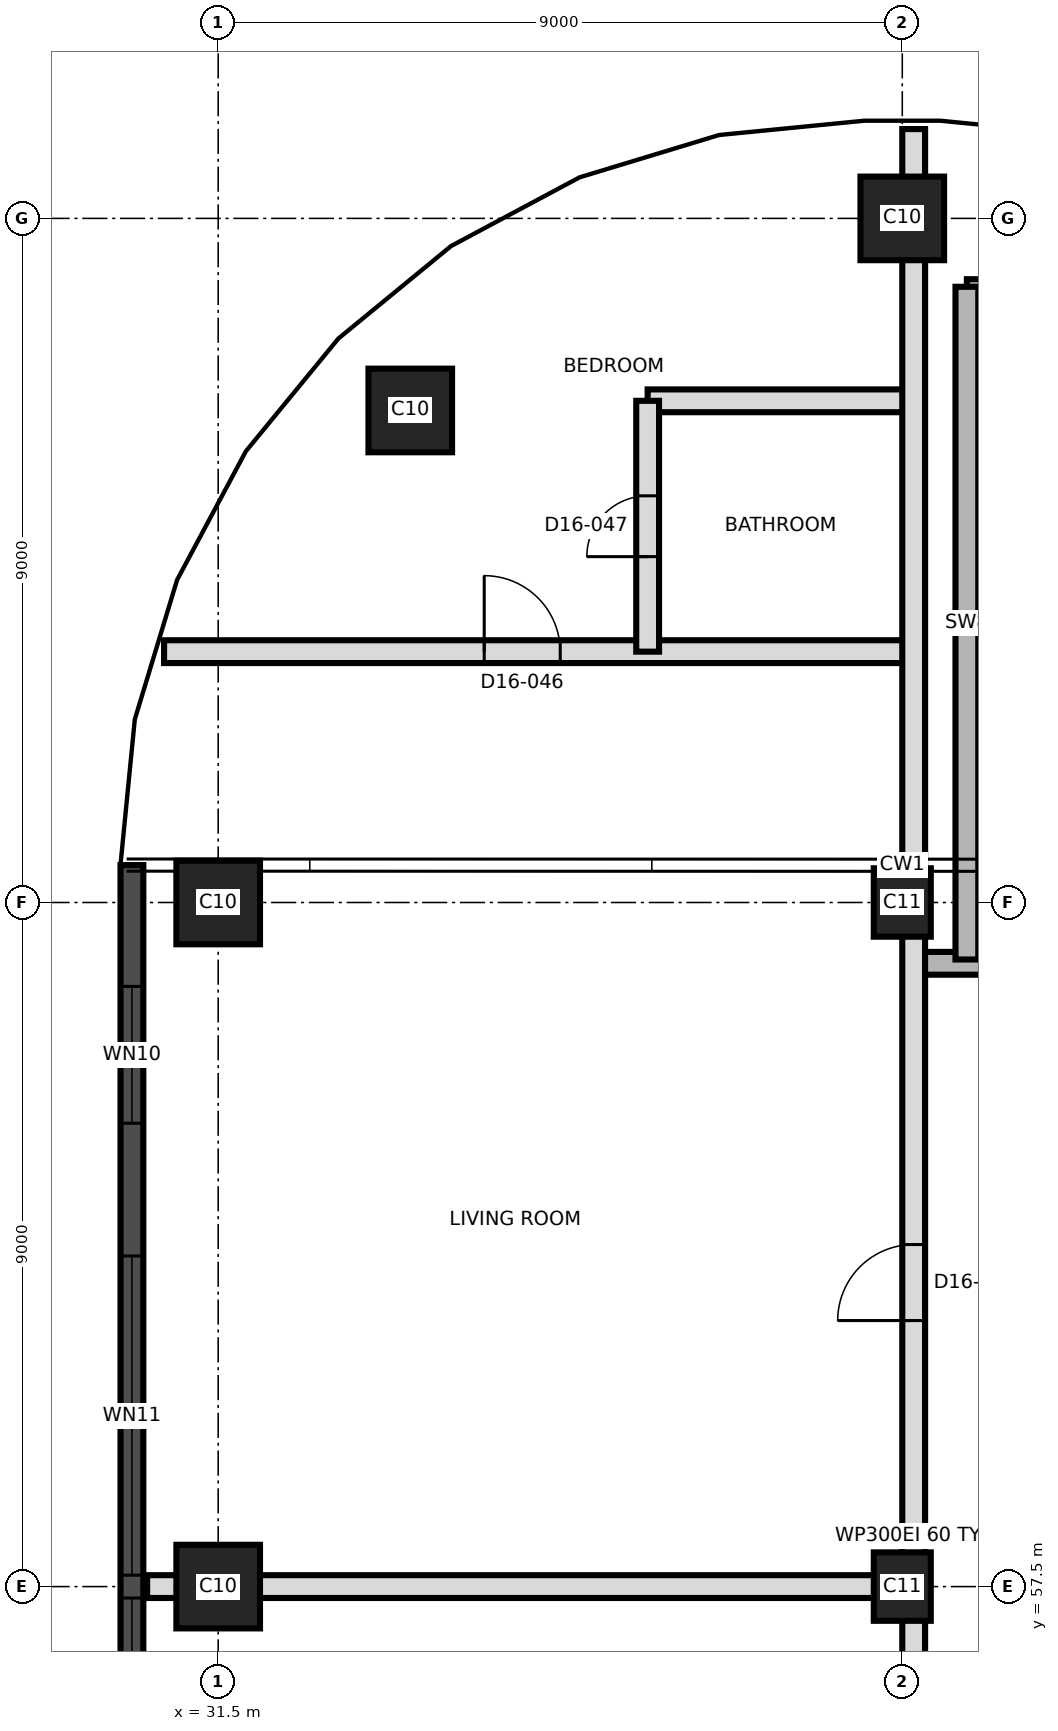
"""IFC4 building model, lengths in metres.
Left out: names, types, materials, properties, quantities, classifications, styles, units other than length and angle.
Written with IfcOpenShell. Run it as: python <this file> out.ifc"""

import sys

from ifc_helpers import new_model, si_unit, direction, frame, frame_2d, origin, origin_2d, place, context, subcontext, project, spatial, rectangle, extrude, element, fill, save


model = new_model("IFC4")
c1 = context("Model", 3, precision=1e-05, world=origin(), true_north=direction((0.0, 1.0)))
c2 = subcontext(c1, "Body", "Model", "MODEL_VIEW")
j1 = project(units=[si_unit("LENGTHUNIT", "METRE"), si_unit("PLANEANGLEUNIT", "RADIAN")], contexts=[c1])
p1 = place(None, origin())
s1 = spatial("IfcSite", under=j1, at=p1, CompositionType="ELEMENT")
p2 = place(p1, origin())
s2 = spatial("IfcBuilding", under=s1, at=p2, CompositionType="ELEMENT")
p3 = place(p2, frame((0.0, 0.0, 160.7)))
s3 = spatial("IfcBuildingStorey", under=s2, at=p3, CompositionType="ELEMENT", Elevation=160.7)
p4 = place(p3, frame((31.5, 57.5, 0.0), z_axis=(0.0, 0.0, 1.0), x_axis=(1.0, 0.0, 0.0)))
e1 = element("IfcColumn", 1, at=p4, inside=s3, PredefinedType="COLUMN", context=c2, shape_type="SweptSolid", body=[
    extrude(rectangle(XDim=1.1, YDim=1.1, at=origin_2d()), origin(), (0.0, 0.0, 1.0), 3.7),
])
p5 = place(p3, frame((40.5, 57.5, 0.0), z_axis=(0.0, 0.0, 1.0), x_axis=(0.0, 1.0, 0.0)))
e2 = element("IfcColumn", 2, at=p5, inside=s3, PredefinedType="COLUMN", context=c2, shape_type="SweptSolid", body=[
    extrude(rectangle(XDim=0.9, YDim=0.75, at=origin_2d()), origin(), (0.0, 0.0, 1.0), 3.7),
])
p6 = place(p3, frame((31.5, 66.5, 0.0), z_axis=(0.0, 0.0, 1.0), x_axis=(1.0, 0.0, 0.0)))
e3 = element("IfcColumn", 3, at=p6, inside=s3, PredefinedType="COLUMN", context=c2, shape_type="SweptSolid", body=[
    extrude(rectangle(XDim=1.1, YDim=1.1, at=origin_2d()), origin(), (0.0, 0.0, 1.0), 3.7),
])
p7 = place(p3, frame((40.5, 66.5, 0.0), z_axis=(0.0, 0.0, 1.0), x_axis=(0.0, 1.0, 0.0)))
e4 = element("IfcColumn", 4, at=p7, inside=s3, PredefinedType="COLUMN", context=c2, shape_type="SweptSolid", body=[
    extrude(rectangle(XDim=0.9, YDim=0.75, at=origin_2d()), origin(), (0.0, 0.0, 1.0), 3.7),
])
for number, where, z_axis, x_axis in (
    (5, (34.027, 72.973, 0.0), (0.0, 0.0, 1.0), (1.0, 0.0, 0.0)),
    (6, (40.5, 75.5, 0.0), (0.0, 0.0, 1.0), (1.0, 0.0, 0.0)),
):
    element("IfcColumn", number, at=place(p3, frame(where, z_axis=z_axis, x_axis=x_axis)), inside=s3, PredefinedType="COLUMN", context=c2, shape_type="SweptSolid", body=[
        extrude(rectangle(XDim=1.1, YDim=1.1, at=origin_2d()), origin(), (0.0, 0.0, 1.0), 3.7),
    ])
p8 = place(p3, frame((30.365, 66.992, 0.0), z_axis=(0.0, 0.0, 1.0), x_axis=(0.0, -1.0, 0.0)))
e7 = element("IfcWall", 7, at=p8, inside=s3, PredefinedType="SOLIDWALL", context=c2, shape_type="SweptSolid", body=[
    extrude(rectangle(XDim=32.981, YDim=0.3, at=frame_2d((16.491, 0.0))), origin(), (0.0, 0.0, 1.0), 3.4),
])
p9 = place(p8, frame((1.596, 0.0, 0.3)))
e8 = element("IfcOpeningElement", 8, at=p9, cuts=e7, PredefinedType="OPENING", context=c2, shape_type="SweptSolid", body=[
    extrude(rectangle(XDim=1.8, YDim=2.4, at=frame_2d((0.9, 1.2))), frame((0.0, 0.16, 0.0), z_axis=(0.0, -1.0, 0.0), x_axis=(1.0, 0.0, 0.0)), (0.0, 0.0, 1.0), 0.32),
])
p10 = place(p8, frame((5.142, 0.0, 0.9)))
e9 = element("IfcOpeningElement", 9, at=p10, cuts=e7, PredefinedType="OPENING", context=c2, shape_type="SweptSolid", body=[
    extrude(rectangle(XDim=4.2, YDim=1.5, at=frame_2d((2.1, 0.75))), frame((0.0, 0.16, 0.0), z_axis=(0.0, -1.0, 0.0), x_axis=(1.0, 0.0, 0.0)), (0.0, 0.0, 1.0), 0.32),
])
p11 = place(p8, frame((9.642, 0.0, 0.9)))
e10 = element("IfcOpeningElement", 10, at=p11, cuts=e7, PredefinedType="OPENING", context=c2, shape_type="SweptSolid", body=[
    extrude(rectangle(XDim=4.2, YDim=1.5, at=frame_2d((2.1, 0.75))), frame((0.0, 0.16, 0.0), z_axis=(0.0, -1.0, 0.0), x_axis=(1.0, 0.0, 0.0)), (0.0, 0.0, 1.0), 0.32),
])
p12 = place(p8, frame((14.142, 0.0, 0.9)))
e11 = element("IfcOpeningElement", 11, at=p12, cuts=e7, PredefinedType="OPENING", context=c2, shape_type="SweptSolid", body=[
    extrude(rectangle(XDim=4.2, YDim=1.5, at=frame_2d((2.1, 0.75))), frame((0.0, 0.16, 0.0), z_axis=(0.0, -1.0, 0.0), x_axis=(1.0, 0.0, 0.0)), (0.0, 0.0, 1.0), 0.32),
])
p13 = place(p8, frame((18.642, 0.0, 0.9)))
e12 = element("IfcOpeningElement", 12, at=p13, cuts=e7, PredefinedType="OPENING", context=c2, shape_type="SweptSolid", body=[
    extrude(rectangle(XDim=4.2, YDim=1.5, at=frame_2d((2.1, 0.75))), frame((0.0, 0.16, 0.0), z_axis=(0.0, -1.0, 0.0), x_axis=(1.0, 0.0, 0.0)), (0.0, 0.0, 1.0), 0.32),
])
p14 = place(p8, frame((23.142, 0.0, 0.9)))
e13 = element("IfcOpeningElement", 13, at=p14, cuts=e7, PredefinedType="OPENING", context=c2, shape_type="SweptSolid", body=[
    extrude(rectangle(XDim=4.2, YDim=1.5, at=frame_2d((2.1, 0.75))), frame((0.0, 0.16, 0.0), z_axis=(0.0, -1.0, 0.0), x_axis=(1.0, 0.0, 0.0)), (0.0, 0.0, 1.0), 0.32),
])
p15 = place(p8, frame((29.337, 0.0, 0.3)))
e14 = element("IfcOpeningElement", 14, at=p15, cuts=e7, PredefinedType="OPENING", context=c2, shape_type="SweptSolid", body=[
    extrude(rectangle(XDim=1.8, YDim=2.4, at=frame_2d((0.9, 1.2))), frame((0.0, 0.16, 0.0), z_axis=(0.0, -1.0, 0.0), x_axis=(1.0, 0.0, 0.0)), (0.0, 0.0, 1.0), 0.32),
])
p16 = place(p3, frame((30.565, 57.5, 0.0), z_axis=(0.0, 0.0, 1.0), x_axis=(1.0, 0.0, 0.0)))
e15 = element("IfcWall", 15, at=p16, inside=s3, PredefinedType="PARTITIONING", context=c2, shape_type="SweptSolid", body=[
    extrude(rectangle(XDim=10.085, YDim=0.3, at=frame_2d((5.042, 0.0))), origin(), (0.0, 0.0, 1.0), 3.4),
])
p17 = place(p3, frame((40.65, 65.7, 0.0), z_axis=(0.0, 0.0, 1.0), x_axis=(1.0, 0.0, 0.0)))
e16 = element("IfcWall", 16, at=p17, inside=s3, PredefinedType="SHEAR", context=c2, shape_type="SweptSolid", body=[
    extrude(rectangle(XDim=6.2, YDim=0.3, at=frame_2d((3.1, 0.0))), origin(), (0.0, 0.0, 1.0), 3.4),
])
p18 = place(p17, frame((1.1, 0.0, 0.0)))
e17 = element("IfcOpeningElement", 17, at=p18, cuts=e16, PredefinedType="OPENING", context=c2, shape_type="SweptSolid", body=[
    extrude(rectangle(XDim=1.2, YDim=2.1, at=frame_2d((0.6, 1.05))), frame((0.0, 0.16, 0.0), z_axis=(0.0, -1.0, 0.0), x_axis=(1.0, 0.0, 0.0)), (0.0, 0.0, 1.0), 0.32),
])
p19 = place(p3, frame((30.788, 69.8, 0.0), z_axis=(0.0, 0.0, 1.0), x_axis=(1.0, 0.0, 0.0)))
e18 = element("IfcWall", 18, at=p19, inside=s3, PredefinedType="PARTITIONING", context=c2, shape_type="SweptSolid", body=[
    extrude(rectangle(XDim=9.862, YDim=0.3, at=frame_2d((4.931, 0.0))), origin(), (0.0, 0.0, 1.0), 3.4),
])
p20 = place(p19, frame((4.212, 0.0, 0.0)))
e19 = element("IfcOpeningElement", 19, at=p20, cuts=e18, PredefinedType="OPENING", context=c2, shape_type="SweptSolid", body=[
    extrude(rectangle(XDim=1.0, YDim=2.1, at=frame_2d((0.5, 1.05))), frame((0.0, 0.16, 0.0), z_axis=(0.0, -1.0, 0.0), x_axis=(1.0, 0.0, 0.0)), (0.0, 0.0, 1.0), 0.32),
])
p21 = place(p3, frame((37.15, 73.1, 0.0), z_axis=(0.0, 0.0, 1.0), x_axis=(1.0, 0.0, 0.0)))
e20 = element("IfcWall", 20, at=p21, inside=s3, PredefinedType="PARTITIONING", context=c2, shape_type="SweptSolid", body=[
    extrude(rectangle(XDim=3.5, YDim=0.3, at=frame_2d((1.75, 0.0))), origin(), (0.0, 0.0, 1.0), 3.4),
])
p22 = place(p3, frame((41.35, 74.55, 0.0), z_axis=(0.0, 0.0, 1.0), x_axis=(1.0, 0.0, 0.0)))
e21 = element("IfcWall", 21, at=p22, inside=s3, PredefinedType="SHEAR", context=c2, shape_type="SweptSolid", body=[
    extrude(rectangle(XDim=3.0, YDim=0.3, at=frame_2d((1.5, 0.0))), origin(), (0.0, 0.0, 1.0), 3.4),
])
p23 = place(p3, frame((37.15, 69.8, 0.0), z_axis=(0.0, 0.0, 1.0), x_axis=(0.0, 1.0, 0.0)))
e22 = element("IfcWall", 22, at=p23, inside=s3, PredefinedType="PARTITIONING", context=c2, shape_type="SweptSolid", body=[
    extrude(rectangle(XDim=3.3, YDim=0.3, at=frame_2d((1.65, 0.0))), origin(), (0.0, 0.0, 1.0), 3.4),
])
p24 = place(p23, frame((1.25, 0.0, 0.0)))
e23 = element("IfcOpeningElement", 23, at=p24, cuts=e22, PredefinedType="OPENING", context=c2, shape_type="SweptSolid", body=[
    extrude(rectangle(XDim=0.8, YDim=2.1, at=frame_2d((0.4, 1.05))), frame((0.0, 0.16, 0.0), z_axis=(0.0, -1.0, 0.0), x_axis=(1.0, 0.0, 0.0)), (0.0, 0.0, 1.0), 0.32),
])
p25 = place(p3, frame((40.65, 39.65, 0.0), z_axis=(0.0, 0.0, 1.0), x_axis=(0.0, 1.0, 0.0)))
e24 = element("IfcWall", 24, at=p25, inside=s3, PredefinedType="PARTITIONING", context=c2, shape_type="SweptSolid", body=[
    extrude(rectangle(XDim=37.025, YDim=0.3, at=frame_2d((18.513, 0.0))), origin(), (0.0, 0.0, 1.0), 3.4),
])
p26 = place(p25, frame((1.0, 0.0, 0.0)))
e25 = element("IfcOpeningElement", 25, at=p26, cuts=e24, PredefinedType="OPENING", context=c2, shape_type="SweptSolid", body=[
    extrude(rectangle(XDim=1.0, YDim=2.1, at=frame_2d((0.5, 1.05))), frame((0.0, 0.16, 0.0), z_axis=(0.0, -1.0, 0.0), x_axis=(1.0, 0.0, 0.0)), (0.0, 0.0, 1.0), 0.32),
])
p27 = place(p25, frame((6.85, 0.0, 0.0)))
e26 = element("IfcOpeningElement", 26, at=p27, cuts=e24, PredefinedType="OPENING", context=c2, shape_type="SweptSolid", body=[
    extrude(rectangle(XDim=1.0, YDim=2.1, at=frame_2d((0.5, 1.05))), frame((0.0, 0.16, 0.0), z_axis=(0.0, -1.0, 0.0), x_axis=(1.0, 0.0, 0.0)), (0.0, 0.0, 1.0), 0.32),
])
p28 = place(p25, frame((14.5, 0.0, 0.0)))
e27 = element("IfcOpeningElement", 27, at=p28, cuts=e24, PredefinedType="OPENING", context=c2, shape_type="SweptSolid", body=[
    extrude(rectangle(XDim=1.0, YDim=2.4, at=frame_2d((0.5, 1.2))), frame((0.0, 0.16, 0.0), z_axis=(0.0, -1.0, 0.0), x_axis=(1.0, 0.0, 0.0)), (0.0, 0.0, 1.0), 0.32),
])
p29 = place(p25, frame((21.35, 0.0, 0.0)))
e28 = element("IfcOpeningElement", 28, at=p29, cuts=e24, PredefinedType="OPENING", context=c2, shape_type="SweptSolid", body=[
    extrude(rectangle(XDim=1.0, YDim=2.4, at=frame_2d((0.5, 1.2))), frame((0.0, 0.16, 0.0), z_axis=(0.0, -1.0, 0.0), x_axis=(1.0, 0.0, 0.0)), (0.0, 0.0, 1.0), 0.32),
])
p30 = place(p3, frame((41.35, 65.75, 0.0), z_axis=(0.0, 0.0, 1.0), x_axis=(0.0, 1.0, 0.0)))
e29 = element("IfcWall", 29, at=p30, inside=s3, PredefinedType="SHEAR", context=c2, shape_type="SweptSolid", body=[
    extrude(rectangle(XDim=8.85, YDim=0.3, at=frame_2d((4.425, 0.0))), origin(), (0.0, 0.0, 1.0), 3.4),
])
p31 = place(p9, origin())
e30 = element("IfcWindow", 30, at=p31, inside=s3, PartitioningType="SINGLE_PANEL", PredefinedType="WINDOW", context=c2, shape_type="SweptSolid", body=[
    extrude(rectangle(XDim=1.8, YDim=2.4, at=frame_2d((0.9, 1.2))), frame((0.0, 0.03, 0.0), z_axis=(0.0, -1.0, 0.0), x_axis=(1.0, 0.0, 0.0)), (0.0, 0.0, 1.0), 0.06),
])
fill(e8, e30)
p32 = place(p10, origin())
e31 = element("IfcWindow", 31, at=p32, inside=s3, PartitioningType="SINGLE_PANEL", PredefinedType="WINDOW", context=c2, shape_type="SweptSolid", body=[
    extrude(rectangle(XDim=4.2, YDim=1.5, at=frame_2d((2.1, 0.75))), frame((0.0, 0.03, 0.0), z_axis=(0.0, -1.0, 0.0), x_axis=(1.0, 0.0, 0.0)), (0.0, 0.0, 1.0), 0.06),
])
fill(e9, e31)
p33 = place(p11, origin())
e32 = element("IfcWindow", 32, at=p33, inside=s3, PartitioningType="SINGLE_PANEL", PredefinedType="WINDOW", context=c2, shape_type="SweptSolid", body=[
    extrude(rectangle(XDim=4.2, YDim=1.5, at=frame_2d((2.1, 0.75))), frame((0.0, 0.03, 0.0), z_axis=(0.0, -1.0, 0.0), x_axis=(1.0, 0.0, 0.0)), (0.0, 0.0, 1.0), 0.06),
])
fill(e10, e32)
p34 = place(p29, origin())
e33 = element("IfcDoor", 33, at=p34, inside=s3, OperationType="SINGLE_SWING_LEFT", PredefinedType="DOOR", context=c2, shape_type="SweptSolid", body=[
    extrude(rectangle(XDim=1.0, YDim=2.4, at=frame_2d((0.5, 1.2))), frame((0.0, 0.025, 0.0), z_axis=(0.0, -1.0, 0.0), x_axis=(1.0, 0.0, 0.0)), (0.0, 0.0, 1.0), 0.05),
])
fill(e28, e33)
p35 = place(p20, origin())
e34 = element("IfcDoor", 34, at=p35, inside=s3, OperationType="SINGLE_SWING_RIGHT", PredefinedType="DOOR", context=c2, shape_type="SweptSolid", body=[
    extrude(rectangle(XDim=1.0, YDim=2.1, at=frame_2d((0.5, 1.05))), frame((0.0, 0.025, 0.0), z_axis=(0.0, -1.0, 0.0), x_axis=(1.0, 0.0, 0.0)), (0.0, 0.0, 1.0), 0.05),
])
fill(e19, e34)
p36 = place(p24, origin())
e35 = element("IfcDoor", 35, at=p36, inside=s3, OperationType="SINGLE_SWING_LEFT", PredefinedType="DOOR", context=c2, shape_type="SweptSolid", body=[
    extrude(rectangle(XDim=0.8, YDim=2.1, at=frame_2d((0.4, 1.05))), frame((0.0, 0.025, 0.0), z_axis=(0.0, -1.0, 0.0), x_axis=(1.0, 0.0, 0.0)), (0.0, 0.0, 1.0), 0.05),
])
fill(e23, e35)
save(model, sys.argv[1])
